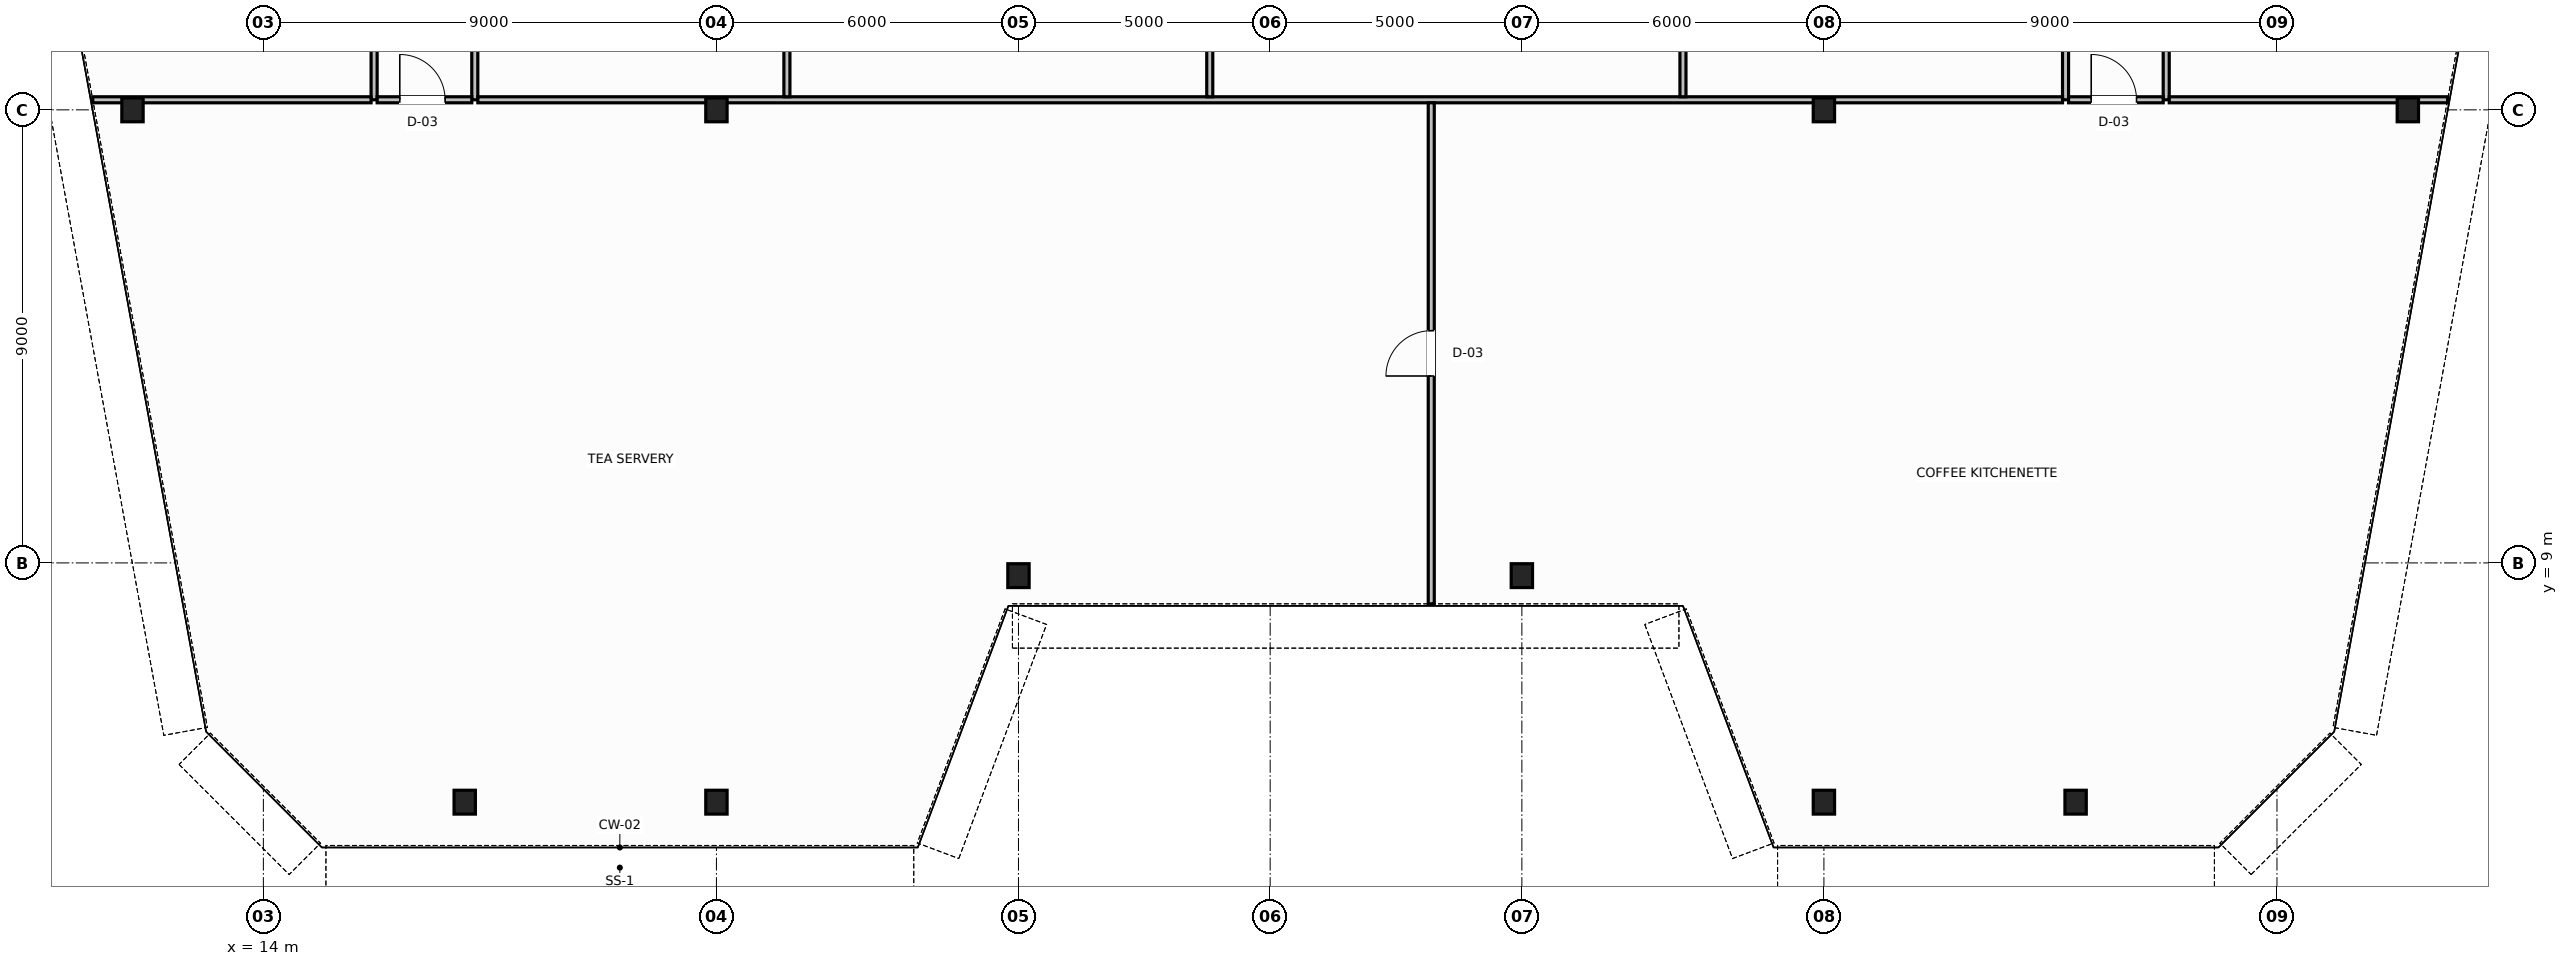
"""IFC4 building model, lengths in metres.
Left out: names, types, materials, properties, quantities, classifications, styles, units other than length and angle.
Written with IfcOpenShell. Run it as: python <this file> out.ifc"""

import sys

from ifc_helpers import new_model, si_unit, direction, frame, frame_2d, origin, origin_2d, place, context, subcontext, project, spatial, rectangle, i_section, extrude, source, transform, mapped, element, fill, save


model = new_model("IFC4")
c1 = context("Model", 3, precision=1e-05, world=origin(), true_north=direction((0.0, 1.0)))
c2 = subcontext(c1, "Body", "Model", "MODEL_VIEW")
j1 = project(units=[si_unit("LENGTHUNIT", "METRE"), si_unit("PLANEANGLEUNIT", "RADIAN")], contexts=[c1])
p1 = place(None, origin())
s1 = spatial("IfcSite", under=j1, at=p1, CompositionType="ELEMENT")
p2 = place(p1, origin())
s2 = spatial("IfcBuilding", under=s1, at=p2, CompositionType="ELEMENT")
p3 = place(p2, frame((0.0, 0.0, 92.0)))
s3 = spatial("IfcBuildingStorey", under=s2, at=p3, CompositionType="ELEMENT", Elevation=92.0)
m1 = source(origin(), c2, "Body", "SweptSolid", [
    extrude(i_section(OverallWidth=0.424, OverallDepth=0.474, WebThickness=0.047, FlangeThickness=0.065, FilletRadius=0.015, at=origin_2d()), origin(), (0.0, 0.0, 1.0), 3.8),
])
for number, where, z_axis, x_axis in (
    (1, (11.4, 18.0, 0.0), (0.0, 0.0, 1.0), (1.0, 0.0, 0.0)),
    (2, (56.6, 18.0, 0.0), (0.0, 0.0, 1.0), (1.0, 0.0, 0.0)),
):
    element("IfcColumn", number, at=place(p3, frame(where, z_axis=z_axis, x_axis=x_axis)), inside=s3, PredefinedType="COLUMN", context=c2, shape_type="MappedRepresentation", body=[
        mapped(m1, transform((0.0, 0.0, 0.0), scale=1.0)),
    ])
m2 = source(origin(), c2, "Body", "SweptSolid", [
    extrude(i_section(OverallWidth=0.424, OverallDepth=0.474, WebThickness=0.047, FlangeThickness=0.065, FilletRadius=0.015, at=origin_2d()), origin(), (0.0, 0.0, 1.0), 3.8),
])
for number, where, z_axis, x_axis in (
    (3, (23.0, 18.0, 0.0), (0.0, 0.0, 1.0), (1.0, 0.0, 0.0)),
    (4, (45.0, 18.0, 0.0), (0.0, 0.0, 1.0), (1.0, 0.0, 0.0)),
):
    element("IfcColumn", number, at=place(p3, frame(where, z_axis=z_axis, x_axis=x_axis)), inside=s3, PredefinedType="COLUMN", context=c2, shape_type="MappedRepresentation", body=[
        mapped(m2, transform((0.0, 0.0, 0.0), scale=1.0)),
    ])
m3 = source(origin(), c2, "Body", "SweptSolid", [
    extrude(i_section(OverallWidth=0.424, OverallDepth=0.474, WebThickness=0.047, FlangeThickness=0.065, FilletRadius=0.015, at=origin_2d()), origin(), (0.0, 0.0, 1.0), 3.744),
])
for number, where, z_axis, x_axis in (
    (5, (18.0, 4.247, 0.032), (0.0, -0.064, 0.998), (1.0, 0.0, 0.0)),
    (6, (23.0, 4.247, 0.032), (0.0, -0.064, 0.998), (1.0, 0.0, 0.0)),
    (7, (29.0, 8.747, 0.032), (0.0, -0.064, 0.998), (1.0, 0.0, 0.0)),
    (8, (39.0, 8.747, 0.032), (0.0, -0.064, 0.998), (1.0, 0.0, 0.0)),
    (9, (45.0, 4.247, 0.032), (0.0, -0.064, 0.998), (1.0, 0.0, 0.0)),
    (10, (50.0, 4.247, 0.032), (0.0, -0.064, 0.998), (1.0, 0.0, 0.0)),
):
    element("IfcColumn", number, at=place(p3, frame(where, z_axis=z_axis, x_axis=x_axis)), inside=s3, PredefinedType="COLUMN", context=c2, shape_type="MappedRepresentation", body=[
        mapped(m3, transform((0.0, 0.0, 0.0), scale=1.0)),
    ])
p4 = place(p3, frame((16.2, 18.2, 0.0), z_axis=(0.0, 0.0, 1.0), x_axis=(0.0, 1.0, 0.0)))
e11 = element("IfcWall", 11, at=p4, inside=s3, PredefinedType="PARTITIONING", context=c2, shape_type="SweptSolid", body=[
    extrude(rectangle(XDim=15.84, YDim=0.12, at=frame_2d((7.92, 0.0))), origin(), (0.0, 0.0, 1.0), 3.58),
])
p5 = place(p4, frame((3.25, 0.0, 0.0)))
e12 = element("IfcOpeningElement", 12, at=p5, cuts=e11, PredefinedType="OPENING", context=c2, shape_type="SweptSolid", body=[
    extrude(rectangle(XDim=0.9, YDim=2.15, at=frame_2d((0.45, 1.075))), frame((0.0, 0.07, 0.0), z_axis=(0.0, -1.0, 0.0), x_axis=(1.0, 0.0, 0.0)), (0.0, 0.0, 1.0), 0.14),
])
p6 = place(p4, frame((11.17, 0.0, 0.0)))
e13 = element("IfcOpeningElement", 13, at=p6, cuts=e11, PredefinedType="OPENING", context=c2, shape_type="SweptSolid", body=[
    extrude(rectangle(XDim=0.9, YDim=2.15, at=frame_2d((0.45, 1.075))), frame((0.0, 0.07, 0.0), z_axis=(0.0, -1.0, 0.0), x_axis=(1.0, 0.0, 0.0)), (0.0, 0.0, 1.0), 0.14),
])
for number, where, z_axis, x_axis in (
    (14, (18.2, 18.2, 0.0), (0.0, 0.0, 1.0), (0.0, 1.0, 0.0)),
    (15, (49.8, 18.2, 0.0), (0.0, 0.0, 1.0), (0.0, 1.0, 0.0)),
):
    element("IfcWall", number, at=place(p3, frame(where, z_axis=z_axis, x_axis=x_axis)), inside=s3, PredefinedType="PARTITIONING", context=c2, shape_type="SweptSolid", body=[
        extrude(rectangle(XDim=15.84, YDim=0.12, at=frame_2d((7.92, 0.0))), origin(), (0.0, 0.0, 1.0), 3.58),
    ])
p7 = place(p3, frame((51.8, 18.2, 0.0), z_axis=(0.0, 0.0, 1.0), x_axis=(0.0, 1.0, 0.0)))
e16 = element("IfcWall", 16, at=p7, inside=s3, PredefinedType="PARTITIONING", context=c2, shape_type="SweptSolid", body=[
    extrude(rectangle(XDim=15.84, YDim=0.12, at=frame_2d((7.92, 0.0))), origin(), (0.0, 0.0, 1.0), 3.58),
])
p8 = place(p7, frame((4.15, 0.0, 0.0)))
e17 = element("IfcOpeningElement", 17, at=p8, cuts=e16, PredefinedType="OPENING", context=c2, shape_type="SweptSolid", body=[
    extrude(rectangle(XDim=0.9, YDim=2.15, at=frame_2d((0.45, 1.075))), frame((0.0, 0.07, 0.0), z_axis=(0.0, -1.0, 0.0), x_axis=(1.0, 0.0, 0.0)), (0.0, 0.0, 1.0), 0.14),
])
p9 = place(p7, frame((12.07, 0.0, 0.0)))
e18 = element("IfcOpeningElement", 18, at=p9, cuts=e16, PredefinedType="OPENING", context=c2, shape_type="SweptSolid", body=[
    extrude(rectangle(XDim=0.9, YDim=2.15, at=frame_2d((0.45, 1.075))), frame((0.0, 0.07, 0.0), z_axis=(0.0, -1.0, 0.0), x_axis=(1.0, 0.0, 0.0)), (0.0, 0.0, 1.0), 0.14),
])
p10 = place(p3, frame((16.26, 18.2, 0.0), z_axis=(0.0, 0.0, 1.0), x_axis=(1.0, 0.0, 0.0)))
e19 = element("IfcWall", 19, at=p10, inside=s3, PredefinedType="PARTITIONING", context=c2, shape_type="SweptSolid", body=[
    extrude(rectangle(XDim=1.88, YDim=0.12, at=frame_2d((0.94, 0.0))), origin(), (0.0, 0.0, 1.0), 2.87),
])
p11 = place(p10, frame((0.45, 0.0, 0.0)))
e20 = element("IfcOpeningElement", 20, at=p11, cuts=e19, PredefinedType="OPENING", context=c2, shape_type="SweptSolid", body=[
    extrude(rectangle(XDim=0.9, YDim=2.15, at=frame_2d((0.45, 1.075))), frame((0.0, 0.07, 0.0), z_axis=(0.0, -1.0, 0.0), x_axis=(1.0, 0.0, 0.0)), (0.0, 0.0, 1.0), 0.14),
])
p12 = place(p3, frame((49.86, 18.2, 0.0), z_axis=(0.0, 0.0, 1.0), x_axis=(1.0, 0.0, 0.0)))
e21 = element("IfcWall", 21, at=p12, inside=s3, PredefinedType="PARTITIONING", context=c2, shape_type="SweptSolid", body=[
    extrude(rectangle(XDim=1.88, YDim=0.12, at=frame_2d((0.94, 0.0))), origin(), (0.0, 0.0, 1.0), 2.87),
])
p13 = place(p12, frame((0.45, 0.0, 0.0)))
e22 = element("IfcOpeningElement", 22, at=p13, cuts=e21, PredefinedType="OPENING", context=c2, shape_type="SweptSolid", body=[
    extrude(rectangle(XDim=0.9, YDim=2.15, at=frame_2d((0.45, 1.075))), frame((0.0, 0.07, 0.0), z_axis=(0.0, -1.0, 0.0), x_axis=(1.0, 0.0, 0.0)), (0.0, 0.0, 1.0), 0.14),
])
for number, where, z_axis, x_axis in (
    (23, (10.61, 18.2, 0.0), (0.0, 0.0, 1.0), (1.0, 0.0, 0.0)),
    (24, (51.86, 18.2, 0.0), (0.0, 0.0, 1.0), (1.0, 0.0, 0.0)),
):
    element("IfcWall", number, at=place(p3, frame(where, z_axis=z_axis, x_axis=x_axis)), inside=s3, PredefinedType="PARTITIONING", context=c2, shape_type="SweptSolid", body=[
        extrude(rectangle(XDim=5.53, YDim=0.12, at=frame_2d((2.765, 0.0))), origin(), (0.0, 0.0, 1.0), 2.87),
    ])
p14 = place(p3, frame((18.26, 18.2, 0.0), z_axis=(0.0, 0.0, 1.0), x_axis=(1.0, 0.0, 0.0)))
e25 = element("IfcWall", 25, at=p14, inside=s3, PredefinedType="PARTITIONING", context=c2, shape_type="SweptSolid", body=[
    extrude(rectangle(XDim=31.48, YDim=0.12, at=frame_2d((15.74, 0.0))), origin(), (0.0, 0.0, 1.0), 2.87),
])
for number, where, z_axis, x_axis in (
    (26, (24.4, 18.26, 0.0), (0.0, 0.0, 1.0), (0.0, 1.0, 0.0)),
    (27, (32.8, 18.26, 0.0), (0.0, 0.0, 1.0), (0.0, 1.0, 0.0)),
    (28, (42.2, 18.26, 0.0), (0.0, 0.0, 1.0), (0.0, 1.0, 0.0)),
):
    element("IfcWall", number, at=place(p3, frame(where, z_axis=z_axis, x_axis=x_axis)), inside=s3, PredefinedType="PARTITIONING", context=c2, shape_type="SweptSolid", body=[
        extrude(rectangle(XDim=15.78, YDim=0.12, at=frame_2d((7.89, 0.0))), origin(), (0.0, 0.0, 1.0), 3.58),
    ])
p15 = place(p3, frame((37.2, 8.187, 0.0), z_axis=(0.0, 0.0, 1.0), x_axis=(0.0, 1.0, 0.0)))
e29 = element("IfcWall", 29, at=p15, inside=s3, PredefinedType="PARTITIONING", context=c2, shape_type="SweptSolid", body=[
    extrude(rectangle(XDim=9.953, YDim=0.12, at=frame_2d((4.977, 0.0))), origin(), (0.0, 0.0, 1.0), 3.58),
])
p16 = place(p15, frame((4.526, 0.0, 0.0)))
e30 = element("IfcOpeningElement", 30, at=p16, cuts=e29, PredefinedType="OPENING", context=c2, shape_type="SweptSolid", body=[
    extrude(rectangle(XDim=0.9, YDim=2.15, at=frame_2d((0.45, 1.075))), frame((0.0, 0.07, 0.0), z_axis=(0.0, -1.0, 0.0), x_axis=(1.0, 0.0, 0.0)), (0.0, 0.0, 1.0), 0.14),
])
m4 = source(origin(), c2, "Body", "SweptSolid", [
    extrude(rectangle(XDim=0.9, YDim=2.15, at=frame_2d((0.45, 1.075))), frame((0.0, 0.025, 0.0), z_axis=(0.0, -1.0, 0.0), x_axis=(1.0, 0.0, 0.0)), (0.0, 0.0, 1.0), 0.05),
])
p17 = place(p11, origin())
e31 = element("IfcDoor", 31, at=p17, inside=s3, OperationType="SINGLE_SWING_LEFT", PredefinedType="DOOR", context=c2, shape_type="MappedRepresentation", body=[
    mapped(m4, transform((0.0, 0.0, 0.0), scale=1.0)),
])
fill(e20, e31)
p18 = place(p16, origin())
e32 = element("IfcDoor", 32, at=p18, inside=s3, OperationType="SINGLE_SWING_RIGHT", PredefinedType="DOOR", context=c2, shape_type="MappedRepresentation", body=[
    mapped(m4, transform((0.0, 0.0, 0.0), scale=1.0)),
])
fill(e30, e32)
p19 = place(p13, origin())
e33 = element("IfcDoor", 33, at=p19, inside=s3, OperationType="SINGLE_SWING_RIGHT", PredefinedType="DOOR", context=c2, shape_type="MappedRepresentation", body=[
    mapped(m4, transform((0.0, 0.0, 0.0), scale=1.0)),
])
fill(e22, e33)
save(model, sys.argv[1])
